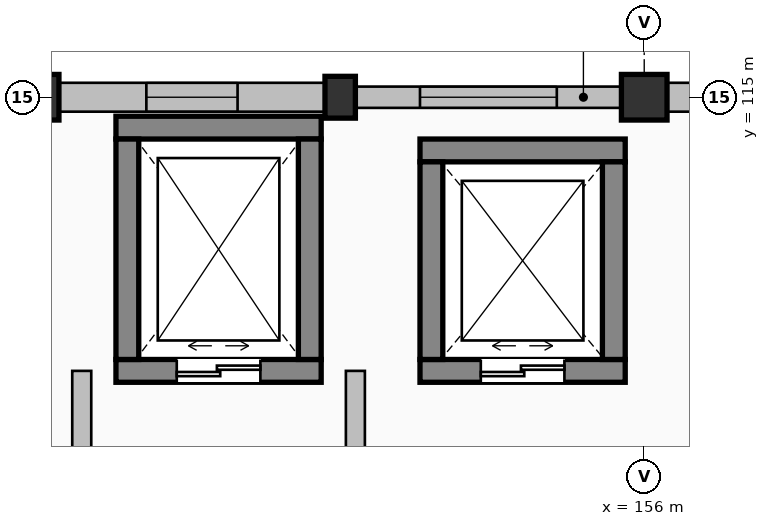
"""IFC4 building model, lengths in metres.
Left out: names, types, materials, properties, quantities, classifications, styles, units other than length and angle.
Written with IfcOpenShell. Run it as: python <this file> out.ifc"""

import sys

from ifc_helpers import new_model, si_unit, direction, frame, frame_2d, origin, origin_2d, place, context, subcontext, project, spatial, rectangle, extrude, element, fill, save


model = new_model("IFC4")
c1 = context("Model", 3, precision=1e-05, world=origin(), true_north=direction((0.0, 1.0)))
c2 = subcontext(c1, "Body", "Model", "MODEL_VIEW")
j1 = project(units=[si_unit("LENGTHUNIT", "METRE"), si_unit("PLANEANGLEUNIT", "RADIAN")], contexts=[c1])
p1 = place(None, origin())
s1 = spatial("IfcSite", under=j1, at=p1, CompositionType="ELEMENT")
p2 = place(p1, origin())
s2 = spatial("IfcBuilding", under=s1, at=p2, CompositionType="ELEMENT")
p3 = place(p2, frame((0.0, 0.0, 18.3)))
s3 = spatial("IfcBuildingStorey", under=s2, at=p3, CompositionType="ELEMENT", Elevation=18.3)
p4 = place(p3, frame((148.0, 115.0, 0.0), z_axis=(0.0, 0.0, 1.0), x_axis=(1.0, 0.0, 0.0)))
e1 = element("IfcColumn", 1, at=p4, inside=s3, PredefinedType="COLUMN", context=c2, shape_type="SweptSolid", body=[
    extrude(rectangle(XDim=0.6, YDim=0.6, at=origin_2d()), origin(), (0.0, 0.0, 1.0), 4.5),
])
p5 = place(p3, frame((152.0, 115.0, 0.0), z_axis=(0.0, 0.0, 1.0), x_axis=(1.0, 0.0, 0.0)))
e2 = element("IfcColumn", 2, at=p5, inside=s3, PredefinedType="PILASTER", context=c2, shape_type="SweptSolid", body=[
    extrude(rectangle(XDim=0.4, YDim=0.55, at=origin_2d()), origin(), (0.0, 0.0, 1.0), 4.5),
])
p6 = place(p3, frame((156.0, 115.0, 0.0), z_axis=(0.0, 0.0, 1.0), x_axis=(1.0, 0.0, 0.0)))
e3 = element("IfcColumn", 3, at=p6, inside=s3, PredefinedType="COLUMN", context=c2, shape_type="SweptSolid", body=[
    extrude(rectangle(XDim=0.6, YDim=0.6, at=origin_2d()), origin(), (0.0, 0.0, 1.0), 4.5),
])
p7 = place(p3, frame((148.3, 115.0, 0.0), z_axis=(0.0, 0.0, 1.0), x_axis=(1.0, 0.0, 0.0)))
e4 = element("IfcWall", 4, at=p7, inside=s3, PredefinedType="SOLIDWALL", context=c2, shape_type="SweptSolid", body=[
    extrude(rectangle(XDim=3.5, YDim=0.38, at=frame_2d((1.75, 0.0))), origin(), (0.0, 0.0, 1.0), 3.885),
])
p8 = place(p7, frame((1.15, 0.0, 0.95)))
e5 = element("IfcOpeningElement", 5, at=p8, cuts=e4, PredefinedType="OPENING", context=c2, shape_type="SweptSolid", body=[
    extrude(rectangle(XDim=1.2, YDim=1.8, at=frame_2d((0.6, 0.9))), frame((0.0, 0.2, 0.0), z_axis=(0.0, -1.0, 0.0), x_axis=(1.0, 0.0, 0.0)), (0.0, 0.0, 1.0), 0.4),
])
p9 = place(p3, frame((152.2, 115.0, 0.0), z_axis=(0.0, 0.0, 1.0), x_axis=(1.0, 0.0, 0.0)))
e6 = element("IfcWall", 6, at=p9, inside=s3, PredefinedType="SOLIDWALL", context=c2, shape_type="SweptSolid", body=[
    extrude(rectangle(XDim=3.5, YDim=0.28, at=frame_2d((1.75, 0.0))), origin(), (0.0, 0.0, 1.0), 3.885),
])
p10 = place(p9, frame((0.85, 0.0, 0.95)))
e7 = element("IfcOpeningElement", 7, at=p10, cuts=e6, PredefinedType="OPENING", context=c2, shape_type="SweptSolid", body=[
    extrude(rectangle(XDim=1.8, YDim=1.8, at=frame_2d((0.9, 0.9))), frame((0.0, 0.15, 0.0), z_axis=(0.0, -1.0, 0.0), x_axis=(1.0, 0.0, 0.0)), (0.0, 0.0, 1.0), 0.3),
])
p11 = place(p3, frame((156.3, 115.0, 0.0), z_axis=(0.0, 0.0, 1.0), x_axis=(1.0, 0.0, 0.0)))
e8 = element("IfcWall", 8, at=p11, inside=s3, PredefinedType="SOLIDWALL", context=c2, shape_type="SweptSolid", body=[
    extrude(rectangle(XDim=3.45, YDim=0.38, at=frame_2d((1.725, 0.0))), origin(), (0.0, 0.0, 1.0), 3.685),
])
p12 = place(p11, frame((0.525, 0.0, 0.95)))
e9 = element("IfcOpeningElement", 9, at=p12, cuts=e8, PredefinedType="OPENING", context=c2, shape_type="SweptSolid", body=[
    extrude(rectangle(XDim=2.4, YDim=1.8, at=frame_2d((1.2, 0.9))), frame((0.0, 0.2, 0.0), z_axis=(0.0, -1.0, 0.0), x_axis=(1.0, 0.0, 0.0)), (0.0, 0.0, 1.0), 0.4),
])
p13 = place(p3, frame((149.05, 111.4, 0.0), z_axis=(0.0, 0.0, 1.0), x_axis=(1.0, 0.0, 0.0)))
e10 = element("IfcWall", 10, at=p13, inside=s3, PredefinedType="SHEAR", context=c2, shape_type="SweptSolid", body=[
    extrude(rectangle(XDim=2.7, YDim=0.3, at=frame_2d((1.35, 0.0))), origin(), (0.0, 0.0, 1.0), 4.2),
])
p14 = place(p13, frame((0.8, 0.0, 0.0)))
e11 = element("IfcOpeningElement", 11, at=p14, cuts=e10, PredefinedType="OPENING", context=c2, shape_type="SweptSolid", body=[
    extrude(rectangle(XDim=1.1, YDim=2.15, at=frame_2d((0.55, 1.075))), frame((0.0, 0.16, 0.0), z_axis=(0.0, -1.0, 0.0), x_axis=(1.0, 0.0, 0.0)), (0.0, 0.0, 1.0), 0.32),
])
p15 = place(p3, frame((151.75, 114.6, 0.0), z_axis=(0.0, 0.0, 1.0), x_axis=(-1.0, 0.0, 0.0)))
e12 = element("IfcWall", 12, at=p15, inside=s3, PredefinedType="SHEAR", context=c2, shape_type="SweptSolid", body=[
    extrude(rectangle(XDim=2.7, YDim=0.3, at=frame_2d((1.35, 0.0))), origin(), (0.0, 0.0, 1.0), 4.2),
])
for number, where, z_axis, x_axis in (
    (13, (149.2, 111.55, 0.0), (0.0, 0.0, 1.0), (0.0, 1.0, 0.0)),
    (14, (151.6, 114.45, 0.0), (0.0, 0.0, 1.0), (0.0, -1.0, 0.0)),
):
    element("IfcWall", number, at=place(p3, frame(where, z_axis=z_axis, x_axis=x_axis)), inside=s3, PredefinedType="SHEAR", context=c2, shape_type="SweptSolid", body=[
        extrude(rectangle(XDim=2.9, YDim=0.3, at=frame_2d((1.45, 0.0))), origin(), (0.0, 0.0, 1.0), 4.2),
    ])
for number, where, z_axis, x_axis in (
    (15, (148.6, 107.8, 0.0), (0.0, 0.0, 1.0), (0.0, 1.0, 0.0)),
    (16, (152.2, 111.4, 0.0), (0.0, 0.0, 1.0), (0.0, -1.0, 0.0)),
):
    element("IfcWall", number, at=place(p3, frame(where, z_axis=z_axis, x_axis=x_axis)), inside=s3, PredefinedType="SOLIDWALL", context=c2, shape_type="SweptSolid", body=[
        extrude(rectangle(XDim=3.6, YDim=0.25, at=frame_2d((1.8, 0.0))), origin(), (0.0, 0.0, 1.0), 4.2),
    ])
p16 = place(p3, frame((153.05, 111.4, 0.0), z_axis=(0.0, 0.0, 1.0), x_axis=(1.0, 0.0, 0.0)))
e17 = element("IfcWall", 17, at=p16, inside=s3, PredefinedType="SHEAR", context=c2, shape_type="SweptSolid", body=[
    extrude(rectangle(XDim=2.7, YDim=0.3, at=frame_2d((1.35, 0.0))), origin(), (0.0, 0.0, 1.0), 4.2),
])
p17 = place(p16, frame((0.8, 0.0, 0.0)))
e18 = element("IfcOpeningElement", 18, at=p17, cuts=e17, PredefinedType="OPENING", context=c2, shape_type="SweptSolid", body=[
    extrude(rectangle(XDim=1.1, YDim=2.15, at=frame_2d((0.55, 1.075))), frame((0.0, 0.16, 0.0), z_axis=(0.0, -1.0, 0.0), x_axis=(1.0, 0.0, 0.0)), (0.0, 0.0, 1.0), 0.32),
])
p18 = place(p3, frame((155.75, 114.3, 0.0), z_axis=(0.0, 0.0, 1.0), x_axis=(-1.0, 0.0, 0.0)))
e19 = element("IfcWall", 19, at=p18, inside=s3, PredefinedType="SHEAR", context=c2, shape_type="SweptSolid", body=[
    extrude(rectangle(XDim=2.7, YDim=0.3, at=frame_2d((1.35, 0.0))), origin(), (0.0, 0.0, 1.0), 4.2),
])
for number, where, z_axis, x_axis in (
    (20, (153.2, 111.55, 0.0), (0.0, 0.0, 1.0), (0.0, 1.0, 0.0)),
    (21, (155.6, 114.15, 0.0), (0.0, 0.0, 1.0), (0.0, -1.0, 0.0)),
):
    element("IfcWall", number, at=place(p3, frame(where, z_axis=z_axis, x_axis=x_axis)), inside=s3, PredefinedType="SHEAR", context=c2, shape_type="SweptSolid", body=[
        extrude(rectangle(XDim=2.6, YDim=0.3, at=frame_2d((1.3, 0.0))), origin(), (0.0, 0.0, 1.0), 4.2),
    ])
p19 = place(p8, origin())
e22 = element("IfcWindow", 22, at=p19, inside=s3, PartitioningType="SINGLE_PANEL", PredefinedType="WINDOW", context=c2, shape_type="SweptSolid", body=[
    extrude(rectangle(XDim=1.2, YDim=1.8, at=frame_2d((0.6, 0.9))), frame((0.0, 0.03, 0.0), z_axis=(0.0, -1.0, 0.0), x_axis=(1.0, 0.0, 0.0)), (0.0, 0.0, 1.0), 0.06),
])
fill(e5, e22)
p20 = place(p10, origin())
e23 = element("IfcWindow", 23, at=p20, inside=s3, PartitioningType="DOUBLE_PANEL_VERTICAL", PredefinedType="WINDOW", context=c2, shape_type="SweptSolid", body=[
    extrude(rectangle(XDim=1.8, YDim=1.8, at=frame_2d((0.9, 0.9))), frame((0.0, 0.03, 0.0), z_axis=(0.0, -1.0, 0.0), x_axis=(1.0, 0.0, 0.0)), (0.0, 0.0, 1.0), 0.06),
])
fill(e7, e23)
p21 = place(p14, origin())
e24 = element("IfcDoor", 24, at=p21, inside=s3, OperationType="DOUBLE_DOOR_SLIDING", PredefinedType="DOOR", context=c2, shape_type="SweptSolid", body=[
    extrude(rectangle(XDim=1.1, YDim=2.15, at=frame_2d((0.55, 1.075))), frame((0.0, 0.025, 0.0), z_axis=(0.0, -1.0, 0.0), x_axis=(1.0, 0.0, 0.0)), (0.0, 0.0, 1.0), 0.05),
])
fill(e11, e24)
p22 = place(p17, origin())
e25 = element("IfcDoor", 25, at=p22, inside=s3, OperationType="DOUBLE_DOOR_SLIDING", PredefinedType="DOOR", context=c2, shape_type="SweptSolid", body=[
    extrude(rectangle(XDim=1.1, YDim=2.15, at=frame_2d((0.55, 1.075))), frame((0.0, 0.025, 0.0), z_axis=(0.0, -1.0, 0.0), x_axis=(1.0, 0.0, 0.0)), (0.0, 0.0, 1.0), 0.05),
])
fill(e18, e25)
save(model, sys.argv[1])
